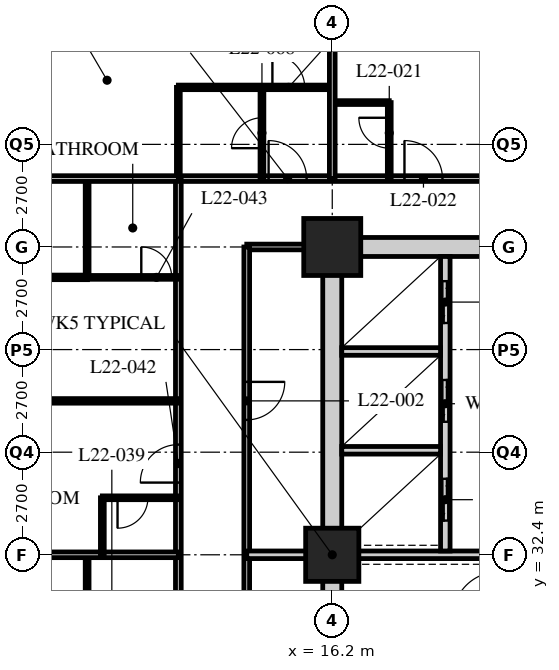
"""IFC4 building model, lengths in metres.
Left out: names, types, materials, properties, quantities, classifications, styles, units other than length and angle.
Written with IfcOpenShell. Run it as: python <this file> out.ifc"""

import sys

from ifc_helpers import new_model, si_unit, direction, frame, frame_2d, origin, origin_2d, place, context, subcontext, project, spatial, rectangle, hollow_rectangle, extrude, element, fill, save


model = new_model("IFC4")
c1 = context("Model", 3, precision=1e-05, world=origin(), true_north=direction((0.0, 1.0)))
c2 = subcontext(c1, "Body", "Model", "MODEL_VIEW")
j1 = project(units=[si_unit("LENGTHUNIT", "METRE"), si_unit("PLANEANGLEUNIT", "RADIAN")], contexts=[c1])
p1 = place(None, origin())
s1 = spatial("IfcSite", under=j1, at=p1, CompositionType="ELEMENT")
p2 = place(p1, origin())
s2 = spatial("IfcBuilding", under=s1, at=p2, CompositionType="ELEMENT")
p3 = place(p2, frame((0.0, 0.0, 87.4)))
s3 = spatial("IfcBuildingStorey", under=s2, at=p3, CompositionType="ELEMENT", Elevation=87.4)
p4 = place(p3, frame((16.2, 32.4, 0.0), z_axis=(0.0, 0.0, 1.0), x_axis=(1.0, 0.0, 0.0)))
e1 = element("IfcColumn", 1, at=p4, inside=s3, PredefinedType="COLUMN", context=c2, shape_type="SweptSolid", body=[
    extrude(hollow_rectangle(XDim=1.4, YDim=1.4, WallThickness=0.12, at=origin_2d()), origin(), (0.0, 0.0, 1.0), 3.4),
])
p5 = place(p3, frame((16.2, 40.5, 0.0), z_axis=(0.0, 0.0, 1.0), x_axis=(1.0, 0.0, 0.0)))
e2 = element("IfcColumn", 2, at=p5, inside=s3, PredefinedType="COLUMN", context=c2, shape_type="SweptSolid", body=[
    extrude(hollow_rectangle(XDim=1.5, YDim=1.5, WallThickness=0.13, at=origin_2d()), origin(), (0.0, 0.0, 1.0), 3.4),
])
p6 = place(p3, frame((12.15, 42.3, 0.0), z_axis=(0.0, 0.0, 1.0), x_axis=(1.0, 0.0, 0.0)))
e3 = element("IfcWall", 3, at=p6, inside=s3, PredefinedType="PARTITIONING", context=c2, shape_type="SweptSolid", body=[
    extrude(rectangle(XDim=32.4, YDim=0.15, at=frame_2d((16.2, 0.0))), origin(), (0.0, 0.0, 1.0), 3.15),
])
p7 = place(p6, frame((5.95, 0.0, 0.0)))
e4 = element("IfcOpeningElement", 4, at=p7, cuts=e3, PredefinedType="OPENING", context=c2, shape_type="SweptSolid", body=[
    extrude(rectangle(XDim=1.0, YDim=2.1, at=frame_2d((0.5, 1.05))), frame((0.0, 0.085, 0.0), z_axis=(0.0, -1.0, 0.0), x_axis=(1.0, 0.0, 0.0)), (0.0, 0.0, 1.0), 0.17),
])
p8 = place(p6, frame((14.6, 0.0, 0.0)))
e5 = element("IfcOpeningElement", 5, at=p8, cuts=e3, PredefinedType="OPENING", context=c2, shape_type="SweptSolid", body=[
    extrude(rectangle(XDim=1.0, YDim=2.1, at=frame_2d((0.5, 1.05))), frame((0.0, 0.085, 0.0), z_axis=(0.0, -1.0, 0.0), x_axis=(1.0, 0.0, 0.0)), (0.0, 0.0, 1.0), 0.17),
])
p9 = place(p6, frame((18.65, 0.0, 0.0)))
e6 = element("IfcOpeningElement", 6, at=p9, cuts=e3, PredefinedType="OPENING", context=c2, shape_type="SweptSolid", body=[
    extrude(rectangle(XDim=1.0, YDim=2.1, at=frame_2d((0.5, 1.05))), frame((0.0, 0.085, 0.0), z_axis=(0.0, -1.0, 0.0), x_axis=(1.0, 0.0, 0.0)), (0.0, 0.0, 1.0), 0.17),
])
p10 = place(p6, frame((22.15, 0.0, 0.0)))
e7 = element("IfcOpeningElement", 7, at=p10, cuts=e3, PredefinedType="OPENING", context=c2, shape_type="SweptSolid", body=[
    extrude(rectangle(XDim=1.0, YDim=2.1, at=frame_2d((0.5, 1.05))), frame((0.0, 0.085, 0.0), z_axis=(0.0, -1.0, 0.0), x_axis=(1.0, 0.0, 0.0)), (0.0, 0.0, 1.0), 0.17),
])
p11 = place(p6, frame((29.025, 0.0, 0.0)))
e8 = element("IfcOpeningElement", 8, at=p11, cuts=e3, PredefinedType="OPENING", context=c2, shape_type="SweptSolid", body=[
    extrude(rectangle(XDim=1.0, YDim=2.1, at=frame_2d((0.5, 1.05))), frame((0.0, 0.085, 0.0), z_axis=(0.0, -1.0, 0.0), x_axis=(1.0, 0.0, 0.0)), (0.0, 0.0, 1.0), 0.17),
])
p12 = place(p6, frame((2.375, 0.0, 0.0)))
e9 = element("IfcOpeningElement", 9, at=p12, cuts=e3, PredefinedType="OPENING", context=c2, shape_type="SweptSolid", body=[
    extrude(rectangle(XDim=1.0, YDim=2.1, at=frame_2d((0.5, 1.05))), frame((0.0, 0.085, 0.0), z_axis=(0.0, -1.0, 0.0), x_axis=(1.0, 0.0, 0.0)), (0.0, 0.0, 1.0), 0.17),
])
p13 = place(p3, frame((12.15, 16.2, 0.0), z_axis=(0.0, 0.0, 1.0), x_axis=(0.0, 1.0, 0.0)))
e10 = element("IfcWall", 10, at=p13, inside=s3, PredefinedType="PARTITIONING", context=c2, shape_type="SweptSolid", body=[
    extrude(rectangle(XDim=26.1, YDim=0.15, at=frame_2d((13.05, 0.0))), origin(), (0.0, 0.0, 1.0), 3.15),
])
p14 = place(p13, frame((2.45, 0.0, 0.0)))
e11 = element("IfcOpeningElement", 11, at=p14, cuts=e10, PredefinedType="OPENING", context=c2, shape_type="SweptSolid", body=[
    extrude(rectangle(XDim=1.0, YDim=2.1, at=frame_2d((0.5, 1.05))), frame((0.0, 0.085, 0.0), z_axis=(0.0, -1.0, 0.0), x_axis=(1.0, 0.0, 0.0)), (0.0, 0.0, 1.0), 0.17),
])
p15 = place(p13, frame((6.5, 0.0, 0.0)))
e12 = element("IfcOpeningElement", 12, at=p15, cuts=e10, PredefinedType="OPENING", context=c2, shape_type="SweptSolid", body=[
    extrude(rectangle(XDim=1.0, YDim=2.1, at=frame_2d((0.5, 1.05))), frame((0.0, 0.085, 0.0), z_axis=(0.0, -1.0, 0.0), x_axis=(1.0, 0.0, 0.0)), (0.0, 0.0, 1.0), 0.17),
])
p16 = place(p13, frame((10.0, 0.0, 0.0)))
e13 = element("IfcOpeningElement", 13, at=p16, cuts=e10, PredefinedType="OPENING", context=c2, shape_type="SweptSolid", body=[
    extrude(rectangle(XDim=1.0, YDim=2.1, at=frame_2d((0.5, 1.05))), frame((0.0, 0.085, 0.0), z_axis=(0.0, -1.0, 0.0), x_axis=(1.0, 0.0, 0.0)), (0.0, 0.0, 1.0), 0.17),
])
p17 = place(p13, frame((18.1, 0.0, 0.0)))
e14 = element("IfcOpeningElement", 14, at=p17, cuts=e10, PredefinedType="OPENING", context=c2, shape_type="SweptSolid", body=[
    extrude(rectangle(XDim=1.0, YDim=2.1, at=frame_2d((0.5, 1.05))), frame((0.0, 0.085, 0.0), z_axis=(0.0, -1.0, 0.0), x_axis=(1.0, 0.0, 0.0)), (0.0, 0.0, 1.0), 0.17),
])
p18 = place(p3, frame((16.0, 40.5, 0.0), z_axis=(0.0, 0.0, 1.0), x_axis=(-1.0, 0.0, 0.0)))
e15 = element("IfcWall", 15, at=p18, inside=s3, PredefinedType="PARTITIONING", context=c2, shape_type="SweptSolid", body=[
    extrude(rectangle(XDim=2.05, YDim=0.15, at=frame_2d((1.025, 0.0))), origin(), (0.0, 0.0, 1.0), 2.05),
])
p19 = place(p3, frame((13.95, 40.5, 0.0), z_axis=(0.0, 0.0, 1.0), x_axis=(0.0, -1.0, 0.0)))
e16 = element("IfcWall", 16, at=p19, inside=s3, PredefinedType="PARTITIONING", context=c2, shape_type="SweptSolid", body=[
    extrude(rectangle(XDim=22.5, YDim=0.15, at=frame_2d((11.25, 0.0))), origin(), (0.0, 0.0, 1.0), 3.15),
])
p20 = place(p19, frame((11.65, 0.0, 0.0)))
e17 = element("IfcOpeningElement", 17, at=p20, cuts=e16, PredefinedType="OPENING", context=c2, shape_type="SweptSolid", body=[
    extrude(rectangle(XDim=1.0, YDim=2.1, at=frame_2d((0.5, 1.05))), frame((0.0, 0.085, 0.0), z_axis=(0.0, -1.0, 0.0), x_axis=(1.0, 0.0, 0.0)), (0.0, 0.0, 1.0), 0.17),
])
p21 = place(p19, frame((3.55, 0.0, 0.0)))
e18 = element("IfcOpeningElement", 18, at=p21, cuts=e16, PredefinedType="OPENING", context=c2, shape_type="SweptSolid", body=[
    extrude(rectangle(XDim=1.0, YDim=2.1, at=frame_2d((0.5, 1.05))), frame((0.0, 0.085, 0.0), z_axis=(0.0, -1.0, 0.0), x_axis=(1.0, 0.0, 0.0)), (0.0, 0.0, 1.0), 0.17),
])
p22 = place(p3, frame((13.95, 32.4, 0.0), z_axis=(0.0, 0.0, 1.0), x_axis=(1.0, 0.0, 0.0)))
e19 = element("IfcWall", 19, at=p22, inside=s3, PredefinedType="SOLIDWALL", context=c2, shape_type="SweptSolid", body=[
    extrude(rectangle(XDim=2.25, YDim=0.2, at=frame_2d((1.125, 0.0))), origin(), (0.0, 0.0, 1.0), 2.388),
])
p23 = place(p3, frame((16.2, 44.3, 0.0), z_axis=(0.0, 0.0, 1.0), x_axis=(1.0, 0.0, 0.0)))
e20 = element("IfcWall", 20, at=p23, inside=s3, PredefinedType="PARTITIONING", context=c2, shape_type="SweptSolid", body=[
    extrude(rectangle(XDim=1.5, YDim=0.1, at=frame_2d((0.75, 0.0))), origin(), (0.0, 0.0, 1.0), 3.15),
])
p24 = place(p3, frame((17.7, 42.3, 0.0), z_axis=(0.0, 0.0, 1.0), x_axis=(0.0, 1.0, 0.0)))
e21 = element("IfcWall", 21, at=p24, inside=s3, PredefinedType="PARTITIONING", context=c2, shape_type="SweptSolid", body=[
    extrude(rectangle(XDim=2.0, YDim=0.1, at=frame_2d((1.0, 0.0))), origin(), (0.0, 0.0, 1.0), 3.15),
])
p25 = place(p24, frame((0.8, 0.0, 0.0)))
e22 = element("IfcOpeningElement", 22, at=p25, cuts=e21, PredefinedType="OPENING", context=c2, shape_type="SweptSolid", body=[
    extrude(rectangle(XDim=0.8, YDim=2.1, at=frame_2d((0.4, 1.05))), frame((0.0, 0.06, 0.0), z_axis=(0.0, -1.0, 0.0), x_axis=(1.0, 0.0, 0.0)), (0.0, 0.0, 1.0), 0.12),
])
p26 = place(p3, frame((9.75, 29.8, 0.0), z_axis=(0.0, 0.0, 1.0), x_axis=(0.0, 1.0, 0.0)))
e23 = element("IfcWall", 23, at=p26, inside=s3, PredefinedType="PARTITIONING", context=c2, shape_type="SweptSolid", body=[
    extrude(rectangle(XDim=2.6, YDim=0.1, at=frame_2d((1.3, 0.0))), origin(), (0.0, 0.0, 1.0), 3.15),
])
p27 = place(p3, frame((12.15, 32.4, 0.0), z_axis=(0.0, 0.0, 1.0), x_axis=(-1.0, 0.0, 0.0)))
e24 = element("IfcWall", 24, at=p27, inside=s3, PredefinedType="PARTITIONING", context=c2, shape_type="SweptSolid", body=[
    extrude(rectangle(XDim=11.85, YDim=0.15, at=frame_2d((5.925, 0.0))), origin(), (0.0, 0.0, 1.0), 2.388),
])
p28 = place(p3, frame((10.15, 32.4, 0.0), z_axis=(0.0, 0.0, 1.0), x_axis=(0.0, 1.0, 0.0)))
e25 = element("IfcWall", 25, at=p28, inside=s3, PredefinedType="PARTITIONING", context=c2, shape_type="SweptSolid", body=[
    extrude(rectangle(XDim=1.5, YDim=0.1, at=frame_2d((0.75, 0.0))), origin(), (0.0, 0.0, 1.0), 3.15),
])
p29 = place(p3, frame((12.15, 33.9, 0.0), z_axis=(0.0, 0.0, 1.0), x_axis=(-1.0, 0.0, 0.0)))
e26 = element("IfcWall", 26, at=p29, inside=s3, PredefinedType="PARTITIONING", context=c2, shape_type="SweptSolid", body=[
    extrude(rectangle(XDim=2.0, YDim=0.1, at=frame_2d((1.0, 0.0))), origin(), (0.0, 0.0, 1.0), 3.15),
])
p30 = place(p29, frame((0.8, 0.0, 0.0)))
e27 = element("IfcOpeningElement", 27, at=p30, cuts=e26, PredefinedType="OPENING", context=c2, shape_type="SweptSolid", body=[
    extrude(rectangle(XDim=0.8, YDim=2.1, at=frame_2d((0.4, 1.05))), frame((0.0, 0.06, 0.0), z_axis=(0.0, -1.0, 0.0), x_axis=(1.0, 0.0, 0.0)), (0.0, 0.0, 1.0), 0.12),
])
p31 = place(p3, frame((9.75, 39.7, 0.0), z_axis=(0.0, 0.0, 1.0), x_axis=(0.0, 1.0, 0.0)))
e28 = element("IfcWall", 28, at=p31, inside=s3, PredefinedType="PARTITIONING", context=c2, shape_type="SweptSolid", body=[
    extrude(rectangle(XDim=2.6, YDim=0.1, at=frame_2d((1.3, 0.0))), origin(), (0.0, 0.0, 1.0), 3.15),
])
p32 = place(p3, frame((12.15, 39.7, 0.0), z_axis=(0.0, 0.0, 1.0), x_axis=(-1.0, 0.0, 0.0)))
e29 = element("IfcWall", 29, at=p32, inside=s3, PredefinedType="PARTITIONING", context=c2, shape_type="SweptSolid", body=[
    extrude(rectangle(XDim=2.4, YDim=0.1, at=frame_2d((1.2, 0.0))), origin(), (0.0, 0.0, 1.0), 3.15),
])
p33 = place(p32, frame((0.175, 0.0, 0.0)))
e30 = element("IfcOpeningElement", 30, at=p33, cuts=e29, PredefinedType="OPENING", context=c2, shape_type="SweptSolid", body=[
    extrude(rectangle(XDim=0.8, YDim=2.1, at=frame_2d((0.4, 1.05))), frame((0.0, 0.06, 0.0), z_axis=(0.0, -1.0, 0.0), x_axis=(1.0, 0.0, 0.0)), (0.0, 0.0, 1.0), 0.12),
])
p34 = place(p3, frame((12.15, 36.45, 0.0), z_axis=(0.0, 0.0, 1.0), x_axis=(-1.0, 0.0, 0.0)))
e31 = element("IfcWall", 31, at=p34, inside=s3, PredefinedType="PARTITIONING", context=c2, shape_type="SweptSolid", body=[
    extrude(rectangle(XDim=11.85, YDim=0.12, at=frame_2d((5.925, 0.0))), origin(), (0.0, 0.0, 1.0), 3.15),
])
p35 = place(p34, frame((6.85, 0.0, 0.0)))
e32 = element("IfcOpeningElement", 32, at=p35, cuts=e31, PredefinedType="OPENING", context=c2, shape_type="SweptSolid", body=[
    extrude(rectangle(XDim=0.85, YDim=2.1, at=frame_2d((0.425, 1.05))), frame((0.0, 0.07, 0.0), z_axis=(0.0, -1.0, 0.0), x_axis=(1.0, 0.0, 0.0)), (0.0, 0.0, 1.0), 0.14),
])
p36 = place(p3, frame((12.15, 44.7, 0.0), z_axis=(0.0, 0.0, 1.0), x_axis=(1.0, 0.0, 0.0)))
e33 = element("IfcWall", 33, at=p36, inside=s3, PredefinedType="PARTITIONING", context=c2, shape_type="SweptSolid", body=[
    extrude(rectangle(XDim=4.05, YDim=0.12, at=frame_2d((2.025, 0.0))), origin(), (0.0, 0.0, 1.0), 3.15),
])
p37 = place(p36, frame((2.475, 0.0, 0.0)))
e34 = element("IfcOpeningElement", 34, at=p37, cuts=e33, PredefinedType="OPENING", context=c2, shape_type="SweptSolid", body=[
    extrude(rectangle(XDim=0.85, YDim=2.1, at=frame_2d((0.425, 1.05))), frame((0.0, 0.07, 0.0), z_axis=(0.0, -1.0, 0.0), x_axis=(1.0, 0.0, 0.0)), (0.0, 0.0, 1.0), 0.14),
])
p38 = place(p3, frame((14.35, 42.3, 0.0), z_axis=(0.0, 0.0, 1.0), x_axis=(0.0, 1.0, 0.0)))
e35 = element("IfcWall", 35, at=p38, inside=s3, PredefinedType="PARTITIONING", context=c2, shape_type="SweptSolid", body=[
    extrude(rectangle(XDim=2.4, YDim=0.1, at=frame_2d((1.2, 0.0))), origin(), (0.0, 0.0, 1.0), 3.15),
])
p39 = place(p38, frame((0.8, 0.0, 0.0)))
e36 = element("IfcOpeningElement", 36, at=p39, cuts=e35, PredefinedType="OPENING", context=c2, shape_type="SweptSolid", body=[
    extrude(rectangle(XDim=0.8, YDim=2.1, at=frame_2d((0.4, 1.05))), frame((0.0, 0.06, 0.0), z_axis=(0.0, -1.0, 0.0), x_axis=(1.0, 0.0, 0.0)), (0.0, 0.0, 1.0), 0.12),
])
p40 = place(p3, frame((12.15, 42.3, 0.0), z_axis=(0.0, 0.0, 1.0), x_axis=(0.0, 1.0, 0.0)))
e37 = element("IfcWall", 37, at=p40, inside=s3, PredefinedType="PARTITIONING", context=c2, shape_type="SweptSolid", body=[
    extrude(rectangle(XDim=2.4, YDim=0.1, at=frame_2d((1.2, 0.0))), origin(), (0.0, 0.0, 1.0), 3.15),
])
p41 = place(p3, frame((4.35, 42.3, 0.0), z_axis=(0.0, 0.0, 1.0), x_axis=(1.0, 0.0, 0.0)))
e38 = element("IfcWall", 38, at=p41, inside=s3, PredefinedType="PARTITIONING", context=c2, shape_type="SweptSolid", body=[
    extrude(rectangle(XDim=7.8, YDim=0.15, at=frame_2d((3.9, 0.0))), origin(), (0.0, 0.0, 1.0), 3.15),
])
p42 = place(p3, frame((16.2, 42.3, 0.0), z_axis=(0.0, 0.0, 1.0), x_axis=(0.0, 1.0, 0.0)))
e39 = element("IfcWall", 39, at=p42, inside=s3, PredefinedType="PARTITIONING", context=c2, shape_type="SweptSolid", body=[
    extrude(rectangle(XDim=6.0, YDim=0.15, at=frame_2d((3.0, 0.0))), origin(), (0.0, 0.0, 1.0), 2.05),
])
p43 = place(p3, frame((9.76, 39.7, 0.0), z_axis=(0.0, 0.0, 1.0), x_axis=(-1.0, 0.0, 0.0)))
e40 = element("IfcWall", 40, at=p43, inside=s3, PredefinedType="PARTITIONING", context=c2, shape_type="SweptSolid", body=[
    extrude(rectangle(XDim=9.46, YDim=0.12, at=frame_2d((4.73, 0.0))), origin(), (0.0, 0.0, 1.0), 3.15),
])
p44 = place(p43, frame((2.525, 0.0, 0.0)))
e41 = element("IfcOpeningElement", 41, at=p44, cuts=e40, PredefinedType="OPENING", context=c2, shape_type="SweptSolid", body=[
    extrude(rectangle(XDim=0.85, YDim=2.0, at=frame_2d((0.425, 1.0))), frame((0.0, 0.07, 0.0), z_axis=(0.0, -1.0, 0.0), x_axis=(1.0, 0.0, 0.0)), (0.0, 0.0, 1.0), 0.14),
])
p45 = place(p3, frame((15.95, 40.5, 0.0), z_axis=(0.0, 0.0, 1.0), x_axis=(1.0, 0.0, 0.0)))
e42 = element("IfcWall", 42, at=p45, inside=s3, PredefinedType="SOLIDWALL", context=c2, shape_type="SweptSolid", body=[
    extrude(rectangle(XDim=8.35, YDim=0.5, at=frame_2d((4.175, 0.0))), origin(), (0.0, 0.0, 1.0), 2.388),
])
p46 = place(p3, frame((16.2, 24.55, 0.0), z_axis=(0.0, 0.0, 1.0), x_axis=(0.0, 1.0, 0.0)))
e43 = element("IfcWall", 43, at=p46, inside=s3, PredefinedType="SOLIDWALL", context=c2, shape_type="SweptSolid", body=[
    extrude(rectangle(XDim=15.7, YDim=0.5, at=frame_2d((7.85, 0.0))), origin(), (0.0, 0.0, 1.0), 2.05),
])
p47 = place(p3, frame((16.45, 32.4, 0.0), z_axis=(0.0, 0.0, 1.0), x_axis=(1.0, 0.0, 0.0)))
e44 = element("IfcWall", 44, at=p47, inside=s3, PredefinedType="SOLIDWALL", context=c2, shape_type="SweptSolid", body=[
    extrude(rectangle(XDim=7.95, YDim=0.2, at=frame_2d((3.975, 0.0))), origin(), (0.0, 0.0, 1.0), 2.388),
])
p48 = place(p3, frame((19.175, 32.5, 0.0), z_axis=(0.0, 0.0, 1.0), x_axis=(0.0, 1.0, 0.0)))
e45 = element("IfcWall", 45, at=p48, inside=s3, PredefinedType="SOLIDWALL", context=c2, shape_type="SweptSolid", body=[
    extrude(rectangle(XDim=7.75, YDim=0.25, at=frame_2d((3.875, 0.0))), origin(), (0.0, 0.0, 1.0), 3.15),
])
p49 = place(p48, frame((0.8, 0.0, 0.0)))
e46 = element("IfcOpeningElement", 46, at=p49, cuts=e45, PredefinedType="OPENING", context=c2, shape_type="SweptSolid", body=[
    extrude(rectangle(XDim=1.1, YDim=2.4, at=frame_2d((0.55, 1.2))), frame((0.0, 0.135, 0.0), z_axis=(0.0, -1.0, 0.0), x_axis=(1.0, 0.0, 0.0)), (0.0, 0.0, 1.0), 0.27),
])
p50 = place(p48, frame((3.4, 0.0, 0.0)))
e47 = element("IfcOpeningElement", 47, at=p50, cuts=e45, PredefinedType="OPENING", context=c2, shape_type="SweptSolid", body=[
    extrude(rectangle(XDim=1.1, YDim=2.4, at=frame_2d((0.55, 1.2))), frame((0.0, 0.135, 0.0), z_axis=(0.0, -1.0, 0.0), x_axis=(1.0, 0.0, 0.0)), (0.0, 0.0, 1.0), 0.27),
])
p51 = place(p48, frame((6.0, 0.0, 0.0)))
e48 = element("IfcOpeningElement", 48, at=p51, cuts=e45, PredefinedType="OPENING", context=c2, shape_type="SweptSolid", body=[
    extrude(rectangle(XDim=1.1, YDim=2.4, at=frame_2d((0.55, 1.2))), frame((0.0, 0.135, 0.0), z_axis=(0.0, -1.0, 0.0), x_axis=(1.0, 0.0, 0.0)), (0.0, 0.0, 1.0), 0.27),
])
for number, where, z_axis, x_axis in (
    (49, (16.45, 35.15, 0.0), (0.0, 0.0, 1.0), (1.0, 0.0, 0.0)),
    (50, (16.45, 37.75, 0.0), (0.0, 0.0, 1.0), (1.0, 0.0, 0.0)),
):
    element("IfcWall", number, at=place(p3, frame(where, z_axis=z_axis, x_axis=x_axis)), inside=s3, PredefinedType="SOLIDWALL", context=c2, shape_type="SweptSolid", body=[
        extrude(rectangle(XDim=2.6, YDim=0.2, at=frame_2d((1.3, 0.0))), origin(), (0.0, 0.0, 1.0), 3.15),
    ])
p52 = place(p21, origin())
e51 = element("IfcDoor", 51, at=p52, inside=s3, OperationType="SINGLE_SWING_LEFT", PredefinedType="DOOR", context=c2, shape_type="SweptSolid", body=[
    extrude(rectangle(XDim=1.0, YDim=2.1, at=frame_2d((0.5, 1.05))), frame((0.0, 0.025, 0.0), z_axis=(0.0, -1.0, 0.0), x_axis=(1.0, 0.0, 0.0)), (0.0, 0.0, 1.0), 0.05),
])
fill(e18, e51)
p53 = place(p25, origin())
e52 = element("IfcDoor", 52, at=p53, inside=s3, OperationType="SINGLE_SWING_RIGHT", PredefinedType="DOOR", context=c2, shape_type="SweptSolid", body=[
    extrude(rectangle(XDim=0.8, YDim=2.1, at=frame_2d((0.4, 1.05))), frame((0.0, 0.025, 0.0), z_axis=(0.0, -1.0, 0.0), x_axis=(1.0, 0.0, 0.0)), (0.0, 0.0, 1.0), 0.05),
])
fill(e22, e52)
p54 = place(p7, origin())
e53 = element("IfcDoor", 53, at=p54, inside=s3, OperationType="SINGLE_SWING_LEFT", PredefinedType="DOOR", context=c2, shape_type="SweptSolid", body=[
    extrude(rectangle(XDim=1.0, YDim=2.1, at=frame_2d((0.5, 1.05))), frame((0.0, 0.025, 0.0), z_axis=(0.0, -1.0, 0.0), x_axis=(1.0, 0.0, 0.0)), (0.0, 0.0, 1.0), 0.05),
])
fill(e4, e53)
p55 = place(p30, origin())
e54 = element("IfcDoor", 54, at=p55, inside=s3, OperationType="SINGLE_SWING_RIGHT", PredefinedType="DOOR", context=c2, shape_type="SweptSolid", body=[
    extrude(rectangle(XDim=0.8, YDim=2.1, at=frame_2d((0.4, 1.05))), frame((0.0, 0.025, 0.0), z_axis=(0.0, -1.0, 0.0), x_axis=(1.0, 0.0, 0.0)), (0.0, 0.0, 1.0), 0.05),
])
fill(e27, e54)
p56 = place(p17, origin())
e55 = element("IfcDoor", 55, at=p56, inside=s3, OperationType="SINGLE_SWING_LEFT", PredefinedType="DOOR", context=c2, shape_type="SweptSolid", body=[
    extrude(rectangle(XDim=1.0, YDim=2.1, at=frame_2d((0.5, 1.05))), frame((0.0, 0.025, 0.0), z_axis=(0.0, -1.0, 0.0), x_axis=(1.0, 0.0, 0.0)), (0.0, 0.0, 1.0), 0.05),
])
fill(e14, e55)
p57 = place(p33, origin())
e56 = element("IfcDoor", 56, at=p57, inside=s3, OperationType="SINGLE_SWING_LEFT", PredefinedType="DOOR", context=c2, shape_type="SweptSolid", body=[
    extrude(rectangle(XDim=0.8, YDim=2.1, at=frame_2d((0.4, 1.05))), frame((0.0, 0.025, 0.0), z_axis=(0.0, -1.0, 0.0), x_axis=(1.0, 0.0, 0.0)), (0.0, 0.0, 1.0), 0.05),
])
fill(e30, e56)
p58 = place(p39, origin())
e57 = element("IfcDoor", 57, at=p58, inside=s3, OperationType="SINGLE_SWING_LEFT", PredefinedType="DOOR", context=c2, shape_type="SweptSolid", body=[
    extrude(rectangle(XDim=0.8, YDim=2.1, at=frame_2d((0.4, 1.05))), frame((0.0, 0.025, 0.0), z_axis=(0.0, -1.0, 0.0), x_axis=(1.0, 0.0, 0.0)), (0.0, 0.0, 1.0), 0.05),
])
fill(e36, e57)
p59 = place(p12, origin())
e58 = element("IfcDoor", 58, at=p59, inside=s3, OperationType="SINGLE_SWING_LEFT", PredefinedType="DOOR", context=c2, shape_type="SweptSolid", body=[
    extrude(rectangle(XDim=1.0, YDim=2.1, at=frame_2d((0.5, 1.05))), frame((0.0, 0.025, 0.0), z_axis=(0.0, -1.0, 0.0), x_axis=(1.0, 0.0, 0.0)), (0.0, 0.0, 1.0), 0.05),
])
fill(e9, e58)
p60 = place(p37, origin())
e59 = element("IfcDoor", 59, at=p60, inside=s3, OperationType="SINGLE_SWING_LEFT", PredefinedType="DOOR", context=c2, shape_type="SweptSolid", body=[
    extrude(rectangle(XDim=0.85, YDim=2.1, at=frame_2d((0.425, 1.05))), frame((0.0, 0.025, 0.0), z_axis=(0.0, -1.0, 0.0), x_axis=(1.0, 0.0, 0.0)), (0.0, 0.0, 1.0), 0.05),
])
fill(e34, e59)
p61 = place(p49, origin())
e60 = element("IfcDoor", 60, at=p61, inside=s3, OperationType="DOUBLE_DOOR_SLIDING", PredefinedType="DOOR", context=c2, shape_type="SweptSolid", body=[
    extrude(rectangle(XDim=1.1, YDim=2.4, at=frame_2d((0.55, 1.2))), frame((0.0, 0.025, 0.0), z_axis=(0.0, -1.0, 0.0), x_axis=(1.0, 0.0, 0.0)), (0.0, 0.0, 1.0), 0.05),
])
fill(e46, e60)
p62 = place(p50, origin())
e61 = element("IfcDoor", 61, at=p62, inside=s3, OperationType="DOUBLE_DOOR_SLIDING", PredefinedType="DOOR", context=c2, shape_type="SweptSolid", body=[
    extrude(rectangle(XDim=1.1, YDim=2.4, at=frame_2d((0.55, 1.2))), frame((0.0, 0.025, 0.0), z_axis=(0.0, -1.0, 0.0), x_axis=(1.0, 0.0, 0.0)), (0.0, 0.0, 1.0), 0.05),
])
fill(e47, e61)
p63 = place(p51, origin())
e62 = element("IfcDoor", 62, at=p63, inside=s3, OperationType="DOUBLE_DOOR_SLIDING", PredefinedType="DOOR", context=c2, shape_type="SweptSolid", body=[
    extrude(rectangle(XDim=1.1, YDim=2.4, at=frame_2d((0.55, 1.2))), frame((0.0, 0.025, 0.0), z_axis=(0.0, -1.0, 0.0), x_axis=(1.0, 0.0, 0.0)), (0.0, 0.0, 1.0), 0.05),
])
fill(e48, e62)
save(model, sys.argv[1])
